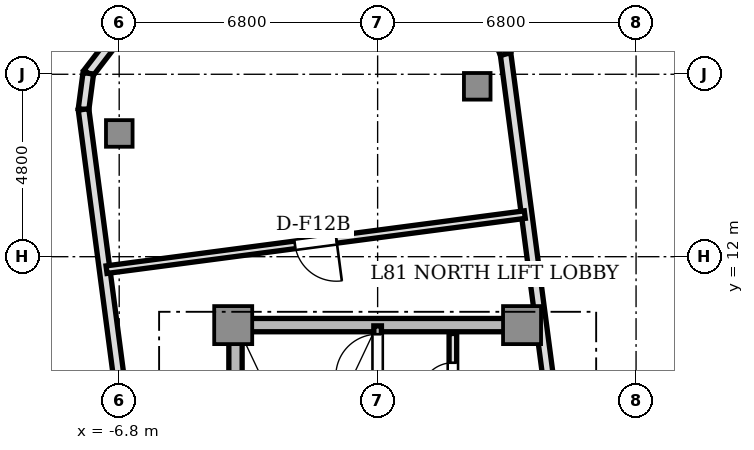
"""IFC4 building model, lengths in metres.
Left out: names, types, materials, properties, quantities, classifications, styles, units other than length and angle.
Written with IfcOpenShell. Run it as: python <this file> out.ifc"""

import sys

from ifc_helpers import new_model, si_unit, direction, frame, frame_2d, origin, origin_2d, place, context, subcontext, project, spatial, rectangle, extrude, source, transform, mapped, element, fill, save


model = new_model("IFC4")
c1 = context("Model", 3, precision=1e-05, world=origin(), true_north=direction((0.0, 1.0)))
c2 = subcontext(c1, "Body", "Model", "MODEL_VIEW")
j1 = project(units=[si_unit("LENGTHUNIT", "METRE"), si_unit("PLANEANGLEUNIT", "RADIAN")], contexts=[c1])
p1 = place(None, origin())
s1 = spatial("IfcSite", under=j1, at=p1, CompositionType="ELEMENT")
p2 = place(p1, origin())
s2 = spatial("IfcBuilding", under=s1, at=p2, CompositionType="ELEMENT")
p3 = place(p2, frame((0.0, 0.0, 292.7)))
s3 = spatial("IfcBuildingStorey", under=s2, at=p3, CompositionType="ELEMENT", Elevation=292.7)
p4 = place(p3, frame((-3.55, 10.2, 0.0), z_axis=(0.0, 0.0, 1.0), x_axis=(1.0, 0.0, 0.0)))
e1 = element("IfcWall", 1, at=p4, inside=s3, PredefinedType="SHEAR", context=c2, shape_type="SweptSolid", body=[
    extrude(rectangle(XDim=7.1, YDim=0.35, at=frame_2d((3.55, 0.0))), origin(), (0.0, 0.0, 1.0), 3.5),
])
p5 = place(p3, frame((-3.74, 2.85, 0.0), z_axis=(0.0, 0.0, 1.0), x_axis=(0.0, 1.0, 0.0)))
e2 = element("IfcWall", 2, at=p5, inside=s3, PredefinedType="SHEAR", context=c2, shape_type="SweptSolid", body=[
    extrude(rectangle(XDim=6.9, YDim=0.35, at=frame_2d((3.45, 0.0))), origin(), (0.0, 0.0, 1.0), 3.5),
])
m1 = source(origin(), c2, "Body", "SweptSolid", [
    extrude(rectangle(XDim=1.0, YDim=1.0, at=origin_2d()), origin(), (0.0, 0.0, 1.0), 3.5),
])
for number, where, z_axis, x_axis in (
    (3, (-3.8, 10.2, 0.0), (0.0, 0.0, 1.0), (1.0, 0.0, 0.0)),
    (4, (3.8, 10.2, 0.0), (0.0, 0.0, 1.0), (1.0, 0.0, 0.0)),
):
    element("IfcColumn", number, at=place(p3, frame(where, z_axis=z_axis, x_axis=x_axis)), inside=s3, PredefinedType="COLUMN", context=c2, shape_type="MappedRepresentation", body=[
        mapped(m1, transform((0.0, 0.0, 0.0), scale=1.0)),
    ])
m2 = source(origin(), c2, "Body", "SweptSolid", [
    extrude(rectangle(XDim=0.7, YDim=0.7, at=origin_2d()), origin(), (0.0, 0.0, 1.0), 3.5),
])
for number, where, z_axis, x_axis in (
    (5, (2.621, 16.483, 0.0), (0.0, 0.0, 1.0), (1.0, 0.0, 0.0)),
    (6, (-6.798, 15.243, 0.0), (0.0, 0.0, 1.0), (1.0, 0.0, 0.0)),
):
    element("IfcColumn", number, at=place(p3, frame(where, z_axis=z_axis, x_axis=x_axis)), inside=s3, PredefinedType="COLUMN", context=c2, shape_type="MappedRepresentation", body=[
        mapped(m2, transform((0.0, 0.0, 0.0), scale=1.0)),
    ])
p6 = place(p3, frame((4.821, 6.283, 0.0), z_axis=(0.0, 0.0, 1.0), x_axis=(-0.130521347626, 0.991445499165, 0.0)))
e7 = element("IfcWall", 7, at=p6, inside=s3, PredefinedType="SOLIDWALL", context=c2, shape_type="SweptSolid", body=[
    extrude(rectangle(XDim=11.15, YDim=0.28, at=frame_2d((5.575, 0.0))), origin(), (0.0, 0.0, 1.0), 3.5),
])
p7 = place(p3, frame((3.366, 17.338, 0.0), z_axis=(0.0, 0.0, 1.0), x_axis=(-0.382659506909, 0.923889442397, 0.0)))
e8 = element("IfcWall", 8, at=p7, inside=s3, PredefinedType="SOLIDWALL", context=c2, shape_type="SweptSolid", body=[
    extrude(rectangle(XDim=0.958, YDim=0.28, at=frame_2d((0.479, 0.0))), origin(), (0.0, 0.0, 1.0), 3.5),
])
p8 = place(p3, frame((-7.031, 17.585, 0.0), z_axis=(0.0, 0.0, 1.0), x_axis=(-0.60861352168, -0.793466811674, 0.0)))
e9 = element("IfcWall", 9, at=p8, inside=s3, PredefinedType="SOLIDWALL", context=c2, shape_type="SweptSolid", body=[
    extrude(rectangle(XDim=0.958, YDim=0.28, at=frame_2d((0.479, 0.0))), origin(), (0.0, 0.0, 1.0), 3.5),
])
p9 = place(p3, frame((-7.613, 16.825, 0.0), z_axis=(0.0, 0.0, 1.0), x_axis=(-0.130527053476, -0.991444747987, 0.0)))
e10 = element("IfcWall", 10, at=p9, inside=s3, PredefinedType="SOLIDWALL", context=c2, shape_type="SweptSolid", body=[
    extrude(rectangle(XDim=0.958, YDim=0.28, at=frame_2d((0.479, 0.0))), origin(), (0.0, 0.0, 1.0), 3.5),
])
p10 = place(p3, frame((-7.738, 15.876, 0.0), z_axis=(0.0, 0.0, 1.0), x_axis=(0.130521347626, -0.991445499165, 0.0)))
e11 = element("IfcWall", 11, at=p10, inside=s3, PredefinedType="SOLIDWALL", context=c2, shape_type="SweptSolid", body=[
    extrude(rectangle(XDim=11.15, YDim=0.28, at=frame_2d((5.575, 0.0))), origin(), (0.0, 0.0, 1.0), 3.5),
])
p11 = place(p3, frame((0.0, 2.5, 0.0), z_axis=(0.0, 0.0, 1.0), x_axis=(0.0, 1.0, 0.0)))
e12 = element("IfcWall", 12, at=p11, inside=s3, PredefinedType="SOLIDWALL", context=c2, shape_type="SweptSolid", body=[
    extrude(rectangle(XDim=7.68, YDim=0.2, at=frame_2d((3.84, 0.0))), origin(), (0.0, 0.0, 1.0), 3.5),
])
p12 = place(p11, frame((6.36, 0.0, 0.0)))
e13 = element("IfcOpeningElement", 13, at=p12, cuts=e12, PredefinedType="OPENING", context=c2, shape_type="SweptSolid", body=[
    extrude(rectangle(XDim=1.1, YDim=2.15, at=frame_2d((0.55, 1.075))), frame((0.0, 0.11, 0.0), z_axis=(0.0, -1.0, 0.0), x_axis=(1.0, 0.0, 0.0)), (0.0, 0.0, 1.0), 0.22),
])
p13 = place(p3, frame((1.98, 5.32, 0.0), z_axis=(0.0, 0.0, 1.0), x_axis=(0.0, 1.0, 0.0)))
e14 = element("IfcWall", 14, at=p13, inside=s3, PredefinedType="SOLIDWALL", context=c2, shape_type="SweptSolid", body=[
    extrude(rectangle(XDim=4.66, YDim=0.2, at=frame_2d((2.33, 0.0))), origin(), (0.0, 0.0, 1.0), 3.05),
])
p14 = place(p13, frame((3.04, 0.0, 0.0)))
e15 = element("IfcOpeningElement", 15, at=p14, cuts=e14, PredefinedType="OPENING", context=c2, shape_type="SweptSolid", body=[
    extrude(rectangle(XDim=0.85, YDim=2.1, at=frame_2d((0.425, 1.05))), frame((0.0, 0.11, 0.0), z_axis=(0.0, -1.0, 0.0), x_axis=(1.0, 0.0, 0.0)), (0.0, 0.0, 1.0), 0.22),
])
p15 = place(p3, frame((3.872, 13.108, 0.0), z_axis=(0.0, 0.0, 1.0), x_axis=(-0.991443437127, -0.130537009991, 0.0)))
e16 = element("IfcWall", 16, at=p15, inside=s3, PredefinedType="SOLIDWALL", context=c2, shape_type="SweptSolid", body=[
    extrude(rectangle(XDim=11.1, YDim=0.2, at=frame_2d((5.55, 0.0))), origin(), (0.0, 0.0, 1.0), 3.05),
])
p16 = place(p15, frame((5.0, 0.0, 0.0)))
e17 = element("IfcOpeningElement", 17, at=p16, cuts=e16, PredefinedType="OPENING", context=c2, shape_type="SweptSolid", body=[
    extrude(rectangle(XDim=1.1, YDim=2.15, at=frame_2d((0.55, 1.075))), frame((0.0, 0.11, 0.0), z_axis=(0.0, -1.0, 0.0), x_axis=(1.0, 0.0, 0.0)), (0.0, 0.0, 1.0), 0.22),
])
m3 = source(origin(), c2, "Body", "SweptSolid", [
    extrude(rectangle(XDim=1.1, YDim=0.05, at=origin_2d()), origin(), (0.0, 0.0, 1.0), 2.15),
])
p17 = place(p12, frame((0.55, 0.0, 0.0)))
e18 = element("IfcDoor", 18, at=p17, inside=s3, OperationType="SINGLE_SWING_LEFT", PredefinedType="DOOR", context=c2, shape_type="MappedRepresentation", body=[
    mapped(m3, transform((0.0, 0.0, 0.0), scale=1.0)),
])
fill(e13, e18)
m4 = source(origin(), c2, "Body", "SweptSolid", [
    extrude(rectangle(XDim=0.85, YDim=0.05, at=origin_2d()), origin(), (0.0, 0.0, 1.0), 2.1),
])
p18 = place(p14, frame((0.425, 0.0, 0.0)))
e19 = element("IfcDoor", 19, at=p18, inside=s3, OperationType="SINGLE_SWING_LEFT", PredefinedType="DOOR", context=c2, shape_type="MappedRepresentation", body=[
    mapped(m4, transform((0.0, 0.0, 0.0), scale=1.0)),
])
fill(e15, e19)
p19 = place(p16, frame((0.55, 0.0, 0.0)))
e20 = element("IfcDoor", 20, at=p19, inside=s3, OperationType="SINGLE_SWING_LEFT", PredefinedType="DOOR", context=c2, shape_type="MappedRepresentation", body=[
    mapped(m3, transform((0.0, 0.0, 0.0), scale=1.0)),
])
fill(e17, e20)
save(model, sys.argv[1])
